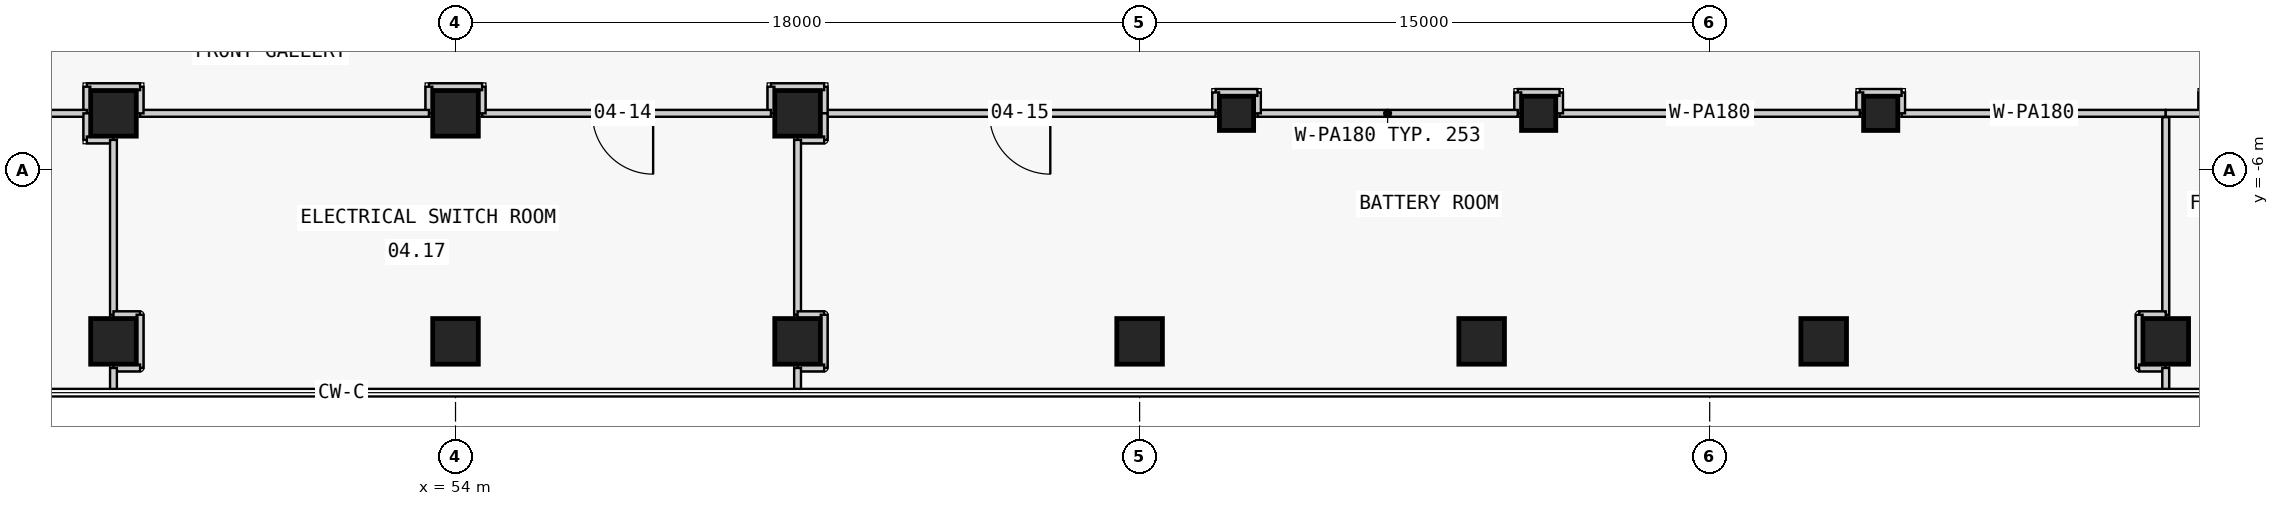
"""IFC4 building model, lengths in metres.
Left out: names, types, materials, properties, quantities, classifications, styles, units other than length and angle.
Written with IfcOpenShell. Run it as: python <this file> out.ifc"""

import sys

from ifc_helpers import new_model, si_unit, direction, frame, frame_2d, origin, origin_2d, place, context, subcontext, project, spatial, rectangle, extrude, element, fill, save


model = new_model("IFC4")
c1 = context("Model", 3, precision=1e-05, world=origin(), true_north=direction((0.0, 1.0)))
c2 = subcontext(c1, "Body", "Model", "MODEL_VIEW")
j1 = project(units=[si_unit("LENGTHUNIT", "METRE"), si_unit("PLANEANGLEUNIT", "RADIAN")], contexts=[c1])
p1 = place(None, origin())
s1 = spatial("IfcSite", under=j1, at=p1, CompositionType="ELEMENT")
p2 = place(p1, origin())
s2 = spatial("IfcBuilding", under=s1, at=p2, CompositionType="ELEMENT")
p3 = place(p2, frame((0.0, 0.0, 21.8)))
s3 = spatial("IfcBuildingStorey", under=s2, at=p3, CompositionType="ELEMENT", Elevation=21.8)
for number, where, z_axis, x_axis in (
    (1, (45.0, -10.5, 0.0), (0.0, 0.0, 1.0), (1.0, 0.0, 0.0)),
    (2, (45.0, -4.5, 0.0), (0.0, 0.0, 1.0), (1.0, 0.0, 0.0)),
    (3, (54.0, -10.5, 0.0), (0.0, 0.0, 1.0), (1.0, 0.0, 0.0)),
    (4, (54.0, -4.5, 0.0), (0.0, 0.0, 1.0), (1.0, 0.0, 0.0)),
    (5, (63.0, -10.5, 0.0), (0.0, 0.0, 1.0), (1.0, 0.0, 0.0)),
    (6, (63.0, -4.5, 0.0), (0.0, 0.0, 1.0), (1.0, 0.0, 0.0)),
    (7, (72.0, -10.5, 0.0), (0.0, 0.0, 1.0), (1.0, 0.0, 0.0)),
    (8, (81.0, -10.5, 0.0), (0.0, 0.0, 1.0), (1.0, 0.0, 0.0)),
    (9, (90.0, -10.5, 0.0), (0.0, 0.0, 1.0), (1.0, 0.0, 0.0)),
    (10, (99.0, -10.5, 0.0), (0.0, 0.0, 1.0), (1.0, 0.0, 0.0)),
):
    element("IfcColumn", number, at=place(p3, frame(where, z_axis=z_axis, x_axis=x_axis)), inside=s3, PredefinedType="COLUMN", context=c2, shape_type="SweptSolid", body=[
        extrude(rectangle(XDim=1.2, YDim=1.2, at=origin_2d()), origin(), (0.0, 0.0, 1.0), 5.0),
    ])
for number, where, z_axis, x_axis in (
    (11, (74.55, -4.5, 0.0), (0.0, 0.0, 1.0), (1.0, 0.0, 0.0)),
    (12, (82.5, -4.5, 0.0), (0.0, 0.0, 1.0), (1.0, 0.0, 0.0)),
    (13, (91.5, -4.5, 0.0), (0.0, 0.0, 1.0), (1.0, 0.0, 0.0)),
):
    element("IfcColumn", number, at=place(p3, frame(where, z_axis=z_axis, x_axis=x_axis)), inside=s3, PredefinedType="COLUMN", context=c2, shape_type="SweptSolid", body=[
        extrude(rectangle(XDim=0.9, YDim=0.9, at=origin_2d()), origin(), (0.0, 0.0, 1.0), 5.0),
    ])
p4 = place(p3, frame((99.0, -4.5, 0.0), z_axis=(0.0, 0.0, 1.0), x_axis=(-1.0, 0.0, 0.0)))
e14 = element("IfcWall", 14, at=p4, inside=s3, PredefinedType="PARTITIONING", context=c2, shape_type="SweptSolid", body=[
    extrude(rectangle(XDim=6.95, YDim=0.18, at=frame_2d((3.475, 0.0))), origin(), (0.0, 0.0, 1.0), 3.7),
])
p5 = place(p3, frame((92.05, -4.5, 0.0), z_axis=(0.0, 0.0, 1.0), x_axis=(0.0, 1.0, 0.0)))
e15 = element("IfcWall", 15, at=p5, inside=s3, PredefinedType="PARTITIONING", context=c2, shape_type="SweptSolid", body=[
    extrude(rectangle(XDim=0.55, YDim=0.18, at=frame_2d((0.275, 0.0))), origin(), (0.0, 0.0, 1.0), 3.7),
])
p6 = place(p3, frame((92.05, -3.95, 0.0), z_axis=(0.0, 0.0, 1.0), x_axis=(-1.0, 0.0, 0.0)))
e16 = element("IfcWall", 16, at=p6, inside=s3, PredefinedType="PARTITIONING", context=c2, shape_type="SweptSolid", body=[
    extrude(rectangle(XDim=1.1, YDim=0.18, at=frame_2d((0.55, 0.0))), origin(), (0.0, 0.0, 1.0), 4.5),
])
p7 = place(p3, frame((90.95, -3.95, 0.0), z_axis=(0.0, 0.0, 1.0), x_axis=(0.0, -1.0, 0.0)))
e17 = element("IfcWall", 17, at=p7, inside=s3, PredefinedType="PARTITIONING", context=c2, shape_type="SweptSolid", body=[
    extrude(rectangle(XDim=0.55, YDim=0.18, at=frame_2d((0.275, 0.0))), origin(), (0.0, 0.0, 1.0), 3.7),
])
p8 = place(p3, frame((90.95, -4.5, 0.0), z_axis=(0.0, 0.0, 1.0), x_axis=(-1.0, 0.0, 0.0)))
e18 = element("IfcWall", 18, at=p8, inside=s3, PredefinedType="PARTITIONING", context=c2, shape_type="SweptSolid", body=[
    extrude(rectangle(XDim=7.9, YDim=0.18, at=frame_2d((3.95, 0.0))), origin(), (0.0, 0.0, 1.0), 3.7),
])
p9 = place(p3, frame((83.05, -4.5, 0.0), z_axis=(0.0, 0.0, 1.0), x_axis=(0.0, 1.0, 0.0)))
e19 = element("IfcWall", 19, at=p9, inside=s3, PredefinedType="PARTITIONING", context=c2, shape_type="SweptSolid", body=[
    extrude(rectangle(XDim=0.55, YDim=0.18, at=frame_2d((0.275, 0.0))), origin(), (0.0, 0.0, 1.0), 3.7),
])
p10 = place(p3, frame((83.05, -3.95, 0.0), z_axis=(0.0, 0.0, 1.0), x_axis=(-1.0, 0.0, 0.0)))
e20 = element("IfcWall", 20, at=p10, inside=s3, PredefinedType="PARTITIONING", context=c2, shape_type="SweptSolid", body=[
    extrude(rectangle(XDim=1.1, YDim=0.18, at=frame_2d((0.55, 0.0))), origin(), (0.0, 0.0, 1.0), 3.7),
])
p11 = place(p3, frame((81.95, -3.95, 0.0), z_axis=(0.0, 0.0, 1.0), x_axis=(0.0, -1.0, 0.0)))
e21 = element("IfcWall", 21, at=p11, inside=s3, PredefinedType="PARTITIONING", context=c2, shape_type="SweptSolid", body=[
    extrude(rectangle(XDim=0.55, YDim=0.18, at=frame_2d((0.275, 0.0))), origin(), (0.0, 0.0, 1.0), 4.5),
])
p12 = place(p3, frame((81.95, -4.5, 0.0), z_axis=(0.0, 0.0, 1.0), x_axis=(-1.0, 0.0, 0.0)))
e22 = element("IfcWall", 22, at=p12, inside=s3, PredefinedType="PARTITIONING", context=c2, shape_type="SweptSolid", body=[
    extrude(rectangle(XDim=6.85, YDim=0.18, at=frame_2d((3.425, 0.0))), origin(), (0.0, 0.0, 1.0), 4.5),
])
p13 = place(p3, frame((75.1, -4.5, 0.0), z_axis=(0.0, 0.0, 1.0), x_axis=(0.0, 1.0, 0.0)))
e23 = element("IfcWall", 23, at=p13, inside=s3, PredefinedType="PARTITIONING", context=c2, shape_type="SweptSolid", body=[
    extrude(rectangle(XDim=0.55, YDim=0.18, at=frame_2d((0.275, 0.0))), origin(), (0.0, 0.0, 1.0), 4.5),
])
p14 = place(p3, frame((75.1, -3.95, 0.0), z_axis=(0.0, 0.0, 1.0), x_axis=(-1.0, 0.0, 0.0)))
e24 = element("IfcWall", 24, at=p14, inside=s3, PredefinedType="PARTITIONING", context=c2, shape_type="SweptSolid", body=[
    extrude(rectangle(XDim=1.1, YDim=0.18, at=frame_2d((0.55, 0.0))), origin(), (0.0, 0.0, 1.0), 3.7),
])
p15 = place(p3, frame((74.0, -3.95, 0.0), z_axis=(0.0, 0.0, 1.0), x_axis=(0.0, -1.0, 0.0)))
e25 = element("IfcWall", 25, at=p15, inside=s3, PredefinedType="PARTITIONING", context=c2, shape_type="SweptSolid", body=[
    extrude(rectangle(XDim=0.55, YDim=0.18, at=frame_2d((0.275, 0.0))), origin(), (0.0, 0.0, 1.0), 4.5),
])
p16 = place(p3, frame((74.0, -4.5, 0.0), z_axis=(0.0, 0.0, 1.0), x_axis=(-1.0, 0.0, 0.0)))
e26 = element("IfcWall", 26, at=p16, inside=s3, PredefinedType="PARTITIONING", context=c2, shape_type="SweptSolid", body=[
    extrude(rectangle(XDim=10.3, YDim=0.18, at=frame_2d((5.15, 0.0))), origin(), (0.0, 0.0, 1.0), 4.5),
])
p17 = place(p16, frame((4.35, 0.0, 0.0)))
e27 = element("IfcOpeningElement", 27, at=p17, cuts=e26, PredefinedType="OPENING", context=c2, shape_type="SweptSolid", body=[
    extrude(rectangle(XDim=1.6, YDim=2.4, at=frame_2d((0.8, 1.2))), frame((0.0, 0.1, 0.0), z_axis=(0.0, -1.0, 0.0), x_axis=(1.0, 0.0, 0.0)), (0.0, 0.0, 1.0), 0.2),
])
p18 = place(p3, frame((63.7, -4.5, 0.0), z_axis=(0.0, 0.0, 1.0), x_axis=(0.0, 1.0, 0.0)))
e28 = element("IfcWall", 28, at=p18, inside=s3, PredefinedType="PARTITIONING", context=c2, shape_type="SweptSolid", body=[
    extrude(rectangle(XDim=0.7, YDim=0.18, at=frame_2d((0.35, 0.0))), origin(), (0.0, 0.0, 1.0), 4.5),
])
p19 = place(p3, frame((63.7, -3.8, 0.0), z_axis=(0.0, 0.0, 1.0), x_axis=(-1.0, 0.0, 0.0)))
e29 = element("IfcWall", 29, at=p19, inside=s3, PredefinedType="PARTITIONING", context=c2, shape_type="SweptSolid", body=[
    extrude(rectangle(XDim=1.4, YDim=0.18, at=frame_2d((0.7, 0.0))), origin(), (0.0, 0.0, 1.0), 4.5),
])
p20 = place(p3, frame((62.3, -3.8, 0.0), z_axis=(0.0, 0.0, 1.0), x_axis=(0.0, -1.0, 0.0)))
e30 = element("IfcWall", 30, at=p20, inside=s3, PredefinedType="PARTITIONING", context=c2, shape_type="SweptSolid", body=[
    extrude(rectangle(XDim=0.7, YDim=0.18, at=frame_2d((0.35, 0.0))), origin(), (0.0, 0.0, 1.0), 4.5),
])
p21 = place(p3, frame((62.3, -4.5, 0.0), z_axis=(0.0, 0.0, 1.0), x_axis=(-1.0, 0.0, 0.0)))
e31 = element("IfcWall", 31, at=p21, inside=s3, PredefinedType="PARTITIONING", context=c2, shape_type="SweptSolid", body=[
    extrude(rectangle(XDim=7.6, YDim=0.18, at=frame_2d((3.8, 0.0))), origin(), (0.0, 0.0, 1.0), 4.5),
])
p22 = place(p21, frame((3.1, 0.0, 0.0)))
e32 = element("IfcOpeningElement", 32, at=p22, cuts=e31, PredefinedType="OPENING", context=c2, shape_type="SweptSolid", body=[
    extrude(rectangle(XDim=1.6, YDim=2.4, at=frame_2d((0.8, 1.2))), frame((0.0, 0.1, 0.0), z_axis=(0.0, -1.0, 0.0), x_axis=(1.0, 0.0, 0.0)), (0.0, 0.0, 1.0), 0.2),
])
p23 = place(p3, frame((54.7, -4.5, 0.0), z_axis=(0.0, 0.0, 1.0), x_axis=(0.0, 1.0, 0.0)))
e33 = element("IfcWall", 33, at=p23, inside=s3, PredefinedType="PARTITIONING", context=c2, shape_type="SweptSolid", body=[
    extrude(rectangle(XDim=0.7, YDim=0.18, at=frame_2d((0.35, 0.0))), origin(), (0.0, 0.0, 1.0), 4.5),
])
p24 = place(p3, frame((54.7, -3.8, 0.0), z_axis=(0.0, 0.0, 1.0), x_axis=(-1.0, 0.0, 0.0)))
e34 = element("IfcWall", 34, at=p24, inside=s3, PredefinedType="PARTITIONING", context=c2, shape_type="SweptSolid", body=[
    extrude(rectangle(XDim=1.4, YDim=0.18, at=frame_2d((0.7, 0.0))), origin(), (0.0, 0.0, 1.0), 4.5),
])
p25 = place(p3, frame((53.3, -3.8, 0.0), z_axis=(0.0, 0.0, 1.0), x_axis=(0.0, -1.0, 0.0)))
e35 = element("IfcWall", 35, at=p25, inside=s3, PredefinedType="PARTITIONING", context=c2, shape_type="SweptSolid", body=[
    extrude(rectangle(XDim=0.7, YDim=0.18, at=frame_2d((0.35, 0.0))), origin(), (0.0, 0.0, 1.0), 4.5),
])
p26 = place(p3, frame((53.3, -4.5, 0.0), z_axis=(0.0, 0.0, 1.0), x_axis=(-1.0, 0.0, 0.0)))
e36 = element("IfcWall", 36, at=p26, inside=s3, PredefinedType="PARTITIONING", context=c2, shape_type="SweptSolid", body=[
    extrude(rectangle(XDim=7.6, YDim=0.18, at=frame_2d((3.8, 0.0))), origin(), (0.0, 0.0, 1.0), 4.5),
])
p27 = place(p3, frame((45.7, -4.5, 0.0), z_axis=(0.0, 0.0, 1.0), x_axis=(0.0, 1.0, 0.0)))
e37 = element("IfcWall", 37, at=p27, inside=s3, PredefinedType="PARTITIONING", context=c2, shape_type="SweptSolid", body=[
    extrude(rectangle(XDim=0.7, YDim=0.18, at=frame_2d((0.35, 0.0))), origin(), (0.0, 0.0, 1.0), 4.5),
])
p28 = place(p3, frame((45.7, -3.8, 0.0), z_axis=(0.0, 0.0, 1.0), x_axis=(-1.0, 0.0, 0.0)))
e38 = element("IfcWall", 38, at=p28, inside=s3, PredefinedType="PARTITIONING", context=c2, shape_type="SweptSolid", body=[
    extrude(rectangle(XDim=1.4, YDim=0.18, at=frame_2d((0.7, 0.0))), origin(), (0.0, 0.0, 1.0), 4.5),
])
p29 = place(p3, frame((44.3, -3.8, 0.0), z_axis=(0.0, 0.0, 1.0), x_axis=(0.0, -1.0, 0.0)))
e39 = element("IfcWall", 39, at=p29, inside=s3, PredefinedType="PARTITIONING", context=c2, shape_type="SweptSolid", body=[
    extrude(rectangle(XDim=0.7, YDim=0.18, at=frame_2d((0.35, 0.0))), origin(), (0.0, 0.0, 1.0), 4.5),
])
p30 = place(p3, frame((44.3, -4.5, 0.0), z_axis=(0.0, 0.0, 1.0), x_axis=(-1.0, 0.0, 0.0)))
e40 = element("IfcWall", 40, at=p30, inside=s3, PredefinedType="PARTITIONING", context=c2, shape_type="SweptSolid", body=[
    extrude(rectangle(XDim=7.6, YDim=0.18, at=frame_2d((3.8, 0.0))), origin(), (0.0, 0.0, 1.0), 4.5),
])
p31 = place(p3, frame((99.95, -3.95, 0.0), z_axis=(0.0, 0.0, 1.0), x_axis=(0.0, -1.0, 0.0)))
e41 = element("IfcWall", 41, at=p31, inside=s3, PredefinedType="PARTITIONING", context=c2, shape_type="SweptSolid", body=[
    extrude(rectangle(XDim=0.55, YDim=0.18, at=frame_2d((0.275, 0.0))), origin(), (0.0, 0.0, 1.0), 3.7),
])
p32 = place(p3, frame((99.95, -4.5, 0.0), z_axis=(0.0, 0.0, 1.0), x_axis=(-1.0, 0.0, 0.0)))
e42 = element("IfcWall", 42, at=p32, inside=s3, PredefinedType="PARTITIONING", context=c2, shape_type="SweptSolid", body=[
    extrude(rectangle(XDim=0.95, YDim=0.18, at=frame_2d((0.475, 0.0))), origin(), (0.0, 0.0, 1.0), 3.7),
])
for number, where, z_axis, x_axis in (
    (43, (44.3, -4.5, 0.0), (0.0, 0.0, 1.0), (0.0, -1.0, 0.0)),
    (44, (44.3, -5.2, 0.0), (0.0, 0.0, 1.0), (1.0, 0.0, 0.0)),
):
    element("IfcWall", number, at=place(p3, frame(where, z_axis=z_axis, x_axis=x_axis)), inside=s3, PredefinedType="PARTITIONING", context=c2, shape_type="SweptSolid", body=[
        extrude(rectangle(XDim=0.7, YDim=0.18, at=frame_2d((0.35, 0.0))), origin(), (0.0, 0.0, 1.0), 4.5),
    ])
p33 = place(p3, frame((45.0, -5.2, 0.0), z_axis=(0.0, 0.0, 1.0), x_axis=(0.0, -1.0, 0.0)))
e45 = element("IfcWall", 45, at=p33, inside=s3, PredefinedType="PARTITIONING", context=c2, shape_type="SweptSolid", body=[
    extrude(rectangle(XDim=4.6, YDim=0.18, at=frame_2d((2.3, 0.0))), origin(), (0.0, 0.0, 1.0), 4.5),
])
p34 = place(p3, frame((45.0, -9.8, 0.0), z_axis=(0.0, 0.0, 1.0), x_axis=(1.0, 0.0, 0.0)))
e46 = element("IfcWall", 46, at=p34, inside=s3, PredefinedType="PARTITIONING", context=c2, shape_type="SweptSolid", body=[
    extrude(rectangle(XDim=0.7, YDim=0.18, at=frame_2d((0.35, 0.0))), origin(), (0.0, 0.0, 1.0), 4.5),
])
p35 = place(p3, frame((45.7, -9.8, 0.0), z_axis=(0.0, 0.0, 1.0), x_axis=(0.0, -1.0, 0.0)))
e47 = element("IfcWall", 47, at=p35, inside=s3, PredefinedType="PARTITIONING", context=c2, shape_type="SweptSolid", body=[
    extrude(rectangle(XDim=1.4, YDim=0.18, at=frame_2d((0.7, 0.0))), origin(), (0.0, 0.0, 1.0), 4.5),
])
p36 = place(p3, frame((45.7, -11.2, 0.0), z_axis=(0.0, 0.0, 1.0), x_axis=(-1.0, 0.0, 0.0)))
e48 = element("IfcWall", 48, at=p36, inside=s3, PredefinedType="PARTITIONING", context=c2, shape_type="SweptSolid", body=[
    extrude(rectangle(XDim=0.7, YDim=0.18, at=frame_2d((0.35, 0.0))), origin(), (0.0, 0.0, 1.0), 4.5),
])
p37 = place(p3, frame((45.0, -11.2, 0.0), z_axis=(0.0, 0.0, 1.0), x_axis=(0.0, -1.0, 0.0)))
e49 = element("IfcWall", 49, at=p37, inside=s3, PredefinedType="PARTITIONING", context=c2, shape_type="SweptSolid", body=[
    extrude(rectangle(XDim=0.65, YDim=0.18, at=frame_2d((0.325, 0.0))), origin(), (0.0, 0.0, 1.0), 4.5),
])
for number, where, z_axis, x_axis in (
    (50, (63.7, -4.5, 0.0), (0.0, 0.0, 1.0), (0.0, -1.0, 0.0)),
    (51, (63.7, -5.2, 0.0), (0.0, 0.0, 1.0), (-1.0, 0.0, 0.0)),
):
    element("IfcWall", number, at=place(p3, frame(where, z_axis=z_axis, x_axis=x_axis)), inside=s3, PredefinedType="PARTITIONING", context=c2, shape_type="SweptSolid", body=[
        extrude(rectangle(XDim=0.7, YDim=0.18, at=frame_2d((0.35, 0.0))), origin(), (0.0, 0.0, 1.0), 4.5),
    ])
p38 = place(p3, frame((63.0, -5.2, 0.0), z_axis=(0.0, 0.0, 1.0), x_axis=(0.0, -1.0, 0.0)))
e52 = element("IfcWall", 52, at=p38, inside=s3, PredefinedType="PARTITIONING", context=c2, shape_type="SweptSolid", body=[
    extrude(rectangle(XDim=4.6, YDim=0.18, at=frame_2d((2.3, 0.0))), origin(), (0.0, 0.0, 1.0), 4.5),
])
p39 = place(p3, frame((63.0, -9.8, 0.0), z_axis=(0.0, 0.0, 1.0), x_axis=(1.0, 0.0, 0.0)))
e53 = element("IfcWall", 53, at=p39, inside=s3, PredefinedType="PARTITIONING", context=c2, shape_type="SweptSolid", body=[
    extrude(rectangle(XDim=0.7, YDim=0.18, at=frame_2d((0.35, 0.0))), origin(), (0.0, 0.0, 1.0), 4.5),
])
p40 = place(p3, frame((63.7, -9.8, 0.0), z_axis=(0.0, 0.0, 1.0), x_axis=(0.0, -1.0, 0.0)))
e54 = element("IfcWall", 54, at=p40, inside=s3, PredefinedType="PARTITIONING", context=c2, shape_type="SweptSolid", body=[
    extrude(rectangle(XDim=1.4, YDim=0.18, at=frame_2d((0.7, 0.0))), origin(), (0.0, 0.0, 1.0), 4.5),
])
p41 = place(p3, frame((63.7, -11.2, 0.0), z_axis=(0.0, 0.0, 1.0), x_axis=(-1.0, 0.0, 0.0)))
e55 = element("IfcWall", 55, at=p41, inside=s3, PredefinedType="PARTITIONING", context=c2, shape_type="SweptSolid", body=[
    extrude(rectangle(XDim=0.7, YDim=0.18, at=frame_2d((0.35, 0.0))), origin(), (0.0, 0.0, 1.0), 4.5),
])
p42 = place(p3, frame((63.0, -11.2, 0.0), z_axis=(0.0, 0.0, 1.0), x_axis=(0.0, -1.0, 0.0)))
e56 = element("IfcWall", 56, at=p42, inside=s3, PredefinedType="PARTITIONING", context=c2, shape_type="SweptSolid", body=[
    extrude(rectangle(XDim=0.65, YDim=0.18, at=frame_2d((0.325, 0.0))), origin(), (0.0, 0.0, 1.0), 4.5),
])
p43 = place(p3, frame((99.0, -4.6, 0.0), z_axis=(0.0, 0.0, 1.0), x_axis=(0.0, -1.0, 0.0)))
e57 = element("IfcWall", 57, at=p43, inside=s3, PredefinedType="PARTITIONING", context=c2, shape_type="SweptSolid", body=[
    extrude(rectangle(XDim=5.2, YDim=0.18, at=frame_2d((2.6, 0.0))), origin(), (0.0, 0.0, 1.0), 4.5),
])
p44 = place(p3, frame((99.0, -9.8, 0.0), z_axis=(0.0, 0.0, 1.0), x_axis=(-1.0, 0.0, 0.0)))
e58 = element("IfcWall", 58, at=p44, inside=s3, PredefinedType="PARTITIONING", context=c2, shape_type="SweptSolid", body=[
    extrude(rectangle(XDim=0.7, YDim=0.18, at=frame_2d((0.35, 0.0))), origin(), (0.0, 0.0, 1.0), 4.5),
])
p45 = place(p3, frame((98.3, -9.8, 0.0), z_axis=(0.0, 0.0, 1.0), x_axis=(0.0, -1.0, 0.0)))
e59 = element("IfcWall", 59, at=p45, inside=s3, PredefinedType="PARTITIONING", context=c2, shape_type="SweptSolid", body=[
    extrude(rectangle(XDim=1.4, YDim=0.18, at=frame_2d((0.7, 0.0))), origin(), (0.0, 0.0, 1.0), 4.5),
])
p46 = place(p3, frame((98.3, -11.2, 0.0), z_axis=(0.0, 0.0, 1.0), x_axis=(1.0, 0.0, 0.0)))
e60 = element("IfcWall", 60, at=p46, inside=s3, PredefinedType="PARTITIONING", context=c2, shape_type="SweptSolid", body=[
    extrude(rectangle(XDim=0.7, YDim=0.18, at=frame_2d((0.35, 0.0))), origin(), (0.0, 0.0, 1.0), 4.5),
])
p47 = place(p3, frame((99.0, -11.2, 0.0), z_axis=(0.0, 0.0, 1.0), x_axis=(0.0, -1.0, 0.0)))
e61 = element("IfcWall", 61, at=p47, inside=s3, PredefinedType="PARTITIONING", context=c2, shape_type="SweptSolid", body=[
    extrude(rectangle(XDim=0.65, YDim=0.18, at=frame_2d((0.325, 0.0))), origin(), (0.0, 0.0, 1.0), 4.5),
])
p48 = place(p22, origin())
e62 = element("IfcDoor", 62, at=p48, inside=s3, OperationType="SINGLE_SWING_LEFT", PredefinedType="DOOR", context=c2, shape_type="SweptSolid", body=[
    extrude(rectangle(XDim=1.6, YDim=2.4, at=frame_2d((0.8, 1.2))), frame((0.0, 0.025, 0.0), z_axis=(0.0, -1.0, 0.0), x_axis=(1.0, 0.0, 0.0)), (0.0, 0.0, 1.0), 0.05),
])
fill(e32, e62)
p49 = place(p17, origin())
e63 = element("IfcDoor", 63, at=p49, inside=s3, OperationType="SINGLE_SWING_LEFT", PredefinedType="DOOR", context=c2, shape_type="SweptSolid", body=[
    extrude(rectangle(XDim=1.6, YDim=2.4, at=frame_2d((0.8, 1.2))), frame((0.0, 0.025, 0.0), z_axis=(0.0, -1.0, 0.0), x_axis=(1.0, 0.0, 0.0)), (0.0, 0.0, 1.0), 0.05),
])
fill(e27, e63)
save(model, sys.argv[1])
